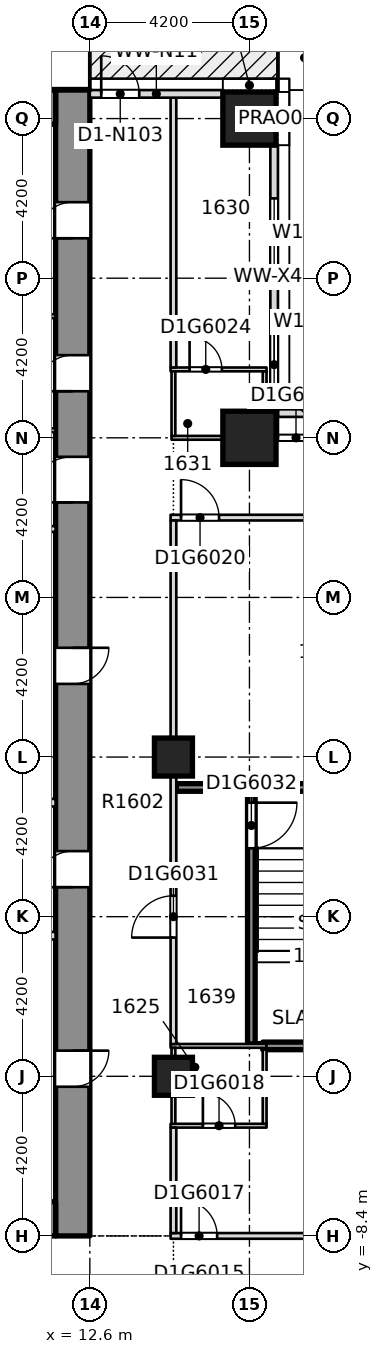
"""IFC4 building model, lengths in metres.
Left out: names, types, materials, properties, quantities, classifications, styles, units other than length and angle.
Written with IfcOpenShell. Run it as: python <this file> out.ifc"""

import sys

from ifc_helpers import new_model, si_unit, direction, frame, frame_2d, origin, origin_2d, place, context, subcontext, project, spatial, rectangle, extrude, element, fill, save


model = new_model("IFC4")
c1 = context("Model", 3, precision=1e-05, world=origin(), true_north=direction((0.0, 1.0)))
c2 = subcontext(c1, "Body", "Model", "MODEL_VIEW")
j1 = project(units=[si_unit("LENGTHUNIT", "METRE"), si_unit("PLANEANGLEUNIT", "RADIAN")], contexts=[c1])
p1 = place(None, origin())
s1 = spatial("IfcSite", under=j1, at=p1, CompositionType="ELEMENT")
p2 = place(p1, origin())
s2 = spatial("IfcBuilding", under=s1, at=p2, CompositionType="ELEMENT")
p3 = place(p2, frame((0.0, 0.0, 69.0)))
s3 = spatial("IfcBuildingStorey", under=s2, at=p3, CompositionType="ELEMENT", Elevation=69.0)
p4 = place(p3, frame((12.15, -8.4, -0.32), z_axis=(0.0, 0.0, 1.0), x_axis=(0.0, 1.0, 0.0)))
e1 = element("IfcWall", 1, at=p4, inside=s3, PredefinedType="SHEAR", context=c2, shape_type="SweptSolid", body=[
    extrude(rectangle(XDim=30.15, YDim=0.9, at=frame_2d((15.075, 0.0))), origin(), (0.0, 0.0, 1.0), 3.45),
])
p5 = place(p4, frame((3.925, 0.0, 0.32)))
e2 = element("IfcOpeningElement", 2, at=p5, cuts=e1, PredefinedType="OPENING", context=c2, shape_type="SweptSolid", body=[
    extrude(rectangle(XDim=0.95, YDim=2.1, at=frame_2d((0.475, 1.05))), frame((0.0, 0.46, 0.0), z_axis=(0.0, -1.0, 0.0), x_axis=(1.0, 0.0, 0.0)), (0.0, 0.0, 1.0), 0.92),
])
p6 = place(p4, frame((9.175, 0.0, 0.32)))
e3 = element("IfcOpeningElement", 3, at=p6, cuts=e1, PredefinedType="OPENING", context=c2, shape_type="SweptSolid", body=[
    extrude(rectangle(XDim=0.95, YDim=2.1, at=frame_2d((0.475, 1.05))), frame((0.0, 0.46, 0.0), z_axis=(0.0, -1.0, 0.0), x_axis=(1.0, 0.0, 0.0)), (0.0, 0.0, 1.0), 0.92),
])
p7 = place(p4, frame((14.525, 0.0, 0.32)))
e4 = element("IfcOpeningElement", 4, at=p7, cuts=e1, PredefinedType="OPENING", context=c2, shape_type="SweptSolid", body=[
    extrude(rectangle(XDim=0.95, YDim=2.1, at=frame_2d((0.475, 1.05))), frame((0.0, 0.46, 0.0), z_axis=(0.0, -1.0, 0.0), x_axis=(1.0, 0.0, 0.0)), (0.0, 0.0, 1.0), 0.92),
])
p8 = place(p4, frame((22.225, 0.0, 0.32)))
e5 = element("IfcOpeningElement", 5, at=p8, cuts=e1, PredefinedType="OPENING", context=c2, shape_type="SweptSolid", body=[
    extrude(rectangle(XDim=0.95, YDim=2.1, at=frame_2d((0.475, 1.05))), frame((0.0, 0.46, 0.0), z_axis=(0.0, -1.0, 0.0), x_axis=(1.0, 0.0, 0.0)), (0.0, 0.0, 1.0), 0.92),
])
p9 = place(p4, frame((26.25, 0.0, 0.32)))
e6 = element("IfcOpeningElement", 6, at=p9, cuts=e1, PredefinedType="OPENING", context=c2, shape_type="SweptSolid", body=[
    extrude(rectangle(XDim=0.95, YDim=2.1, at=frame_2d((0.475, 1.05))), frame((0.0, 0.46, 0.0), z_axis=(0.0, -1.0, 0.0), x_axis=(1.0, 0.0, 0.0)), (0.0, 0.0, 1.0), 0.92),
])
p10 = place(p4, frame((19.3, 0.0, 0.32)))
e7 = element("IfcOpeningElement", 7, at=p10, cuts=e1, PredefinedType="OPENING", context=c2, shape_type="SweptSolid", body=[
    extrude(rectangle(XDim=1.2, YDim=2.1, at=frame_2d((0.6, 1.05))), frame((0.0, 0.46, 0.0), z_axis=(0.0, -1.0, 0.0), x_axis=(1.0, 0.0, 0.0)), (0.0, 0.0, 1.0), 0.92),
])
p11 = place(p3, frame((-11.7, -7.95, -0.32), z_axis=(0.0, 0.0, 1.0), x_axis=(1.0, 0.0, 0.0)))
e8 = element("IfcWall", 8, at=p11, inside=s3, PredefinedType="SHEAR", context=c2, shape_type="SweptSolid", body=[
    extrude(rectangle(XDim=23.4, YDim=0.9, at=frame_2d((11.7, 0.0))), origin(), (0.0, 0.0, 1.0), 3.45),
])
p12 = place(p11, frame((6.95, 0.0, 0.32)))
e9 = element("IfcOpeningElement", 9, at=p12, cuts=e8, PredefinedType="OPENING", context=c2, shape_type="SweptSolid", body=[
    extrude(rectangle(XDim=1.8, YDim=2.1, at=frame_2d((0.9, 1.05))), frame((0.0, 0.46, 0.0), z_axis=(0.0, -1.0, 0.0), x_axis=(1.0, 0.0, 0.0)), (0.0, 0.0, 1.0), 0.92),
])
p13 = place(p11, frame((14.65, 0.0, 0.32)))
e10 = element("IfcOpeningElement", 10, at=p13, cuts=e8, PredefinedType="OPENING", context=c2, shape_type="SweptSolid", body=[
    extrude(rectangle(XDim=1.8, YDim=2.1, at=frame_2d((0.9, 1.05))), frame((0.0, 0.46, 0.0), z_axis=(0.0, -1.0, 0.0), x_axis=(1.0, 0.0, 0.0)), (0.0, 0.0, 1.0), 0.92),
])
p14 = place(p3, frame((-11.7, 21.3, -0.32), z_axis=(0.0, 0.0, 1.0), x_axis=(1.0, 0.0, 0.0)))
e11 = element("IfcWall", 11, at=p14, inside=s3, PredefinedType="SOLIDWALL", context=c2, shape_type="SweptSolid", body=[
    extrude(rectangle(XDim=23.4, YDim=0.9, at=frame_2d((11.7, 0.0))), origin(), (0.0, 0.0, 1.0), 3.45),
])
for number, where, z_axis, x_axis in (
    (12, (16.8, 12.6, -0.32), (0.0, 0.0, 1.0), (1.0, 0.0, 0.0)),
    (13, (16.8, 21.0, -0.32), (0.0, 0.0, 1.0), (1.0, 0.0, 0.0)),
):
    element("IfcColumn", number, at=place(p3, frame(where, z_axis=z_axis, x_axis=x_axis)), inside=s3, PredefinedType="COLUMN", context=c2, shape_type="SweptSolid", body=[
        extrude(rectangle(XDim=1.4, YDim=1.4, at=origin_2d()), origin(), (0.0, 0.0, 1.0), 3.45),
    ])
for number, where, z_axis, x_axis in (
    (14, (14.8, -4.2, -0.32), (0.0, 0.0, 1.0), (1.0, 0.0, 0.0)),
    (15, (14.8, 4.2, -0.32), (0.0, 0.0, 1.0), (1.0, 0.0, 0.0)),
):
    element("IfcColumn", number, at=place(p3, frame(where, z_axis=z_axis, x_axis=x_axis)), inside=s3, PredefinedType="COLUMN", context=c2, shape_type="SweptSolid", body=[
        extrude(rectangle(XDim=1.0, YDim=1.0, at=origin_2d()), origin(), (0.0, 0.0, 1.0), 3.45),
    ])
p15 = place(p3, frame((14.725, -8.4, 0.0), z_axis=(0.0, 0.0, 1.0), x_axis=(1.0, 0.0, 0.0)))
e16 = element("IfcWall", 16, at=p15, inside=s3, PredefinedType="PARTITIONING", context=c2, shape_type="SweptSolid", body=[
    extrude(rectangle(XDim=11.025, YDim=0.15, at=frame_2d((5.512, 0.0))), origin(), (0.0, 0.0, 1.0), 3.13),
])
p16 = place(p15, frame((0.275, 0.0, 0.0)))
e17 = element("IfcOpeningElement", 17, at=p16, cuts=e16, PredefinedType="OPENING", context=c2, shape_type="SweptSolid", body=[
    extrude(rectangle(XDim=0.95, YDim=2.1, at=frame_2d((0.475, 1.05))), frame((0.0, 0.085, 0.0), z_axis=(0.0, -1.0, 0.0), x_axis=(1.0, 0.0, 0.0)), (0.0, 0.0, 1.0), 0.17),
])
p17 = place(p3, frame((14.725, -5.5, 0.0), z_axis=(0.0, 0.0, 1.0), x_axis=(1.0, 0.0, 0.0)))
e18 = element("IfcWall", 18, at=p17, inside=s3, PredefinedType="PARTITIONING", context=c2, shape_type="SweptSolid", body=[
    extrude(rectangle(XDim=2.525, YDim=0.1, at=frame_2d((1.262, 0.0))), origin(), (0.0, 0.0, 1.0), 3.13),
])
p18 = place(p17, frame((0.85, 0.0, 0.0)))
e19 = element("IfcOpeningElement", 19, at=p18, cuts=e18, PredefinedType="OPENING", context=c2, shape_type="SweptSolid", body=[
    extrude(rectangle(XDim=0.85, YDim=2.1, at=frame_2d((0.425, 1.05))), frame((0.0, 0.06, 0.0), z_axis=(0.0, -1.0, 0.0), x_axis=(1.0, 0.0, 0.0)), (0.0, 0.0, 1.0), 0.12),
])
p19 = place(p3, frame((14.725, -3.4, 0.0), z_axis=(0.0, 0.0, 1.0), x_axis=(1.0, 0.0, 0.0)))
e20 = element("IfcWall", 20, at=p19, inside=s3, PredefinedType="PARTITIONING", context=c2, shape_type="SweptSolid", body=[
    extrude(rectangle(XDim=2.525, YDim=0.1, at=frame_2d((1.262, 0.0))), origin(), (0.0, 0.0, 1.0), 3.13),
])
p20 = place(p3, frame((17.15, -3.4, 0.0), z_axis=(0.0, 0.0, 1.0), x_axis=(1.0, 0.0, 0.0)))
e21 = element("IfcWall", 21, at=p20, inside=s3, PredefinedType="SOLIDWALL", context=c2, shape_type="SweptSolid", body=[
    extrude(rectangle(XDim=3.25, YDim=0.2, at=frame_2d((1.625, 0.0))), origin(), (0.0, 0.0, 1.0), 3.13),
])
p21 = place(p3, frame((14.875, 3.4, 0.0), z_axis=(0.0, 0.0, 1.0), x_axis=(1.0, 0.0, 0.0)))
e22 = element("IfcWall", 22, at=p21, inside=s3, PredefinedType="SOLIDWALL", context=c2, shape_type="SweptSolid", body=[
    extrude(rectangle(XDim=5.575, YDim=0.2, at=frame_2d((2.788, 0.0))), origin(), (0.0, 0.0, 1.0), 3.13),
])
p22 = place(p3, frame((14.725, 10.5, 0.0), z_axis=(0.0, 0.0, 1.0), x_axis=(1.0, 0.0, 0.0)))
e23 = element("IfcWall", 23, at=p22, inside=s3, PredefinedType="PARTITIONING", context=c2, shape_type="SweptSolid", body=[
    extrude(rectangle(XDim=11.025, YDim=0.15, at=frame_2d((5.512, 0.0))), origin(), (0.0, 0.0, 1.0), 3.13),
])
p23 = place(p22, frame((0.275, 0.0, 0.0)))
e24 = element("IfcOpeningElement", 24, at=p23, cuts=e23, PredefinedType="OPENING", context=c2, shape_type="SweptSolid", body=[
    extrude(rectangle(XDim=1.0, YDim=2.1, at=frame_2d((0.5, 1.05))), frame((0.0, 0.085, 0.0), z_axis=(0.0, -1.0, 0.0), x_axis=(1.0, 0.0, 0.0)), (0.0, 0.0, 1.0), 0.17),
])
p24 = place(p3, frame((14.75, 12.6, 0.0), z_axis=(0.0, 0.0, 1.0), x_axis=(1.0, 0.0, 0.0)))
e25 = element("IfcWall", 25, at=p24, inside=s3, PredefinedType="PARTITIONING", context=c2, shape_type="SweptSolid", body=[
    extrude(rectangle(XDim=2.5, YDim=0.1, at=frame_2d((1.25, 0.0))), origin(), (0.0, 0.0, 1.0), 3.13),
])
p25 = place(p3, frame((17.15, 12.6, 0.0), z_axis=(0.0, 0.0, 1.0), x_axis=(1.0, 0.0, 0.0)))
e26 = element("IfcWall", 26, at=p25, inside=s3, PredefinedType="PARTITIONING", context=c2, shape_type="SweptSolid", body=[
    extrude(rectangle(XDim=0.25, YDim=0.15, at=frame_2d((0.125, 0.0))), origin(), (0.0, 0.0, 1.0), 3.13),
])
p26 = place(p3, frame((14.725, 14.4, 0.0), z_axis=(0.0, 0.0, 1.0), x_axis=(1.0, 0.0, 0.0)))
e27 = element("IfcWall", 27, at=p26, inside=s3, PredefinedType="PARTITIONING", context=c2, shape_type="SweptSolid", body=[
    extrude(rectangle(XDim=2.525, YDim=0.1, at=frame_2d((1.262, 0.0))), origin(), (0.0, 0.0, 1.0), 3.13),
])
p27 = place(p26, frame((0.5, 0.0, 0.0)))
e28 = element("IfcOpeningElement", 28, at=p27, cuts=e27, PredefinedType="OPENING", context=c2, shape_type="SweptSolid", body=[
    extrude(rectangle(XDim=0.85, YDim=2.1, at=frame_2d((0.425, 1.05))), frame((0.0, 0.06, 0.0), z_axis=(0.0, -1.0, 0.0), x_axis=(1.0, 0.0, 0.0)), (0.0, 0.0, 1.0), 0.12),
])
p28 = place(p3, frame((14.8, -8.325, 0.0), z_axis=(0.0, 0.0, 1.0), x_axis=(0.0, 1.0, 0.0)))
e29 = element("IfcWall", 29, at=p28, inside=s3, PredefinedType="PARTITIONING", context=c2, shape_type="SweptSolid", body=[
    extrude(rectangle(XDim=2.775, YDim=0.15, at=frame_2d((1.387, 0.0))), origin(), (0.0, 0.0, 1.0), 3.13),
])
p29 = place(p3, frame((14.8, -5.45, 0.0), z_axis=(0.0, 0.0, 1.0), x_axis=(0.0, 1.0, 0.0)))
e30 = element("IfcWall", 30, at=p29, inside=s3, PredefinedType="PARTITIONING", context=c2, shape_type="SweptSolid", body=[
    extrude(rectangle(XDim=2.0, YDim=0.1, at=frame_2d((1.0, 0.0))), origin(), (0.0, 0.0, 1.0), 3.13),
])
p30 = place(p3, frame((14.8, -3.35, 0.0), z_axis=(0.0, 0.0, 1.0), x_axis=(0.0, 1.0, 0.0)))
e31 = element("IfcWall", 31, at=p30, inside=s3, PredefinedType="PARTITIONING", context=c2, shape_type="SweptSolid", body=[
    extrude(rectangle(XDim=13.775, YDim=0.15, at=frame_2d((6.888, 0.0))), origin(), (0.0, 0.0, 1.0), 3.13),
])
p31 = place(p30, frame((2.8, 0.0, 0.0)))
e32 = element("IfcOpeningElement", 32, at=p31, cuts=e31, PredefinedType="OPENING", context=c2, shape_type="SweptSolid", body=[
    extrude(rectangle(XDim=1.1, YDim=2.1, at=frame_2d((0.55, 1.05))), frame((0.0, 0.085, 0.0), z_axis=(0.0, -1.0, 0.0), x_axis=(1.0, 0.0, 0.0)), (0.0, 0.0, 1.0), 0.17),
])
p32 = place(p3, frame((14.8, 12.65, 0.0), z_axis=(0.0, 0.0, 1.0), x_axis=(0.0, 1.0, 0.0)))
e33 = element("IfcWall", 33, at=p32, inside=s3, PredefinedType="PARTITIONING", context=c2, shape_type="SweptSolid", body=[
    extrude(rectangle(XDim=1.7, YDim=0.1, at=frame_2d((0.85, 0.0))), origin(), (0.0, 0.0, 1.0), 3.13),
])
p33 = place(p3, frame((14.8, 14.45, 0.0), z_axis=(0.0, 0.0, 1.0), x_axis=(0.0, 1.0, 0.0)))
e34 = element("IfcWall", 34, at=p33, inside=s3, PredefinedType="PARTITIONING", context=c2, shape_type="SweptSolid", body=[
    extrude(rectangle(XDim=7.1, YDim=0.15, at=frame_2d((3.55, 0.0))), origin(), (0.0, 0.0, 1.0), 3.13),
])
p34 = place(p3, frame((16.85, -3.35, 0.0), z_axis=(0.0, 0.0, 1.0), x_axis=(0.0, 1.0, 0.0)))
e35 = element("IfcWall", 35, at=p34, inside=s3, PredefinedType="SOLIDWALL", context=c2, shape_type="SweptSolid", body=[
    extrude(rectangle(XDim=6.65, YDim=0.2, at=frame_2d((3.325, 0.0))), origin(), (0.0, 0.0, 1.0), 3.13),
])
p35 = place(p34, frame((5.15, 0.0, 0.0)))
e36 = element("IfcOpeningElement", 36, at=p35, cuts=e35, PredefinedType="OPENING", context=c2, shape_type="SweptSolid", body=[
    extrude(rectangle(XDim=1.2, YDim=2.1, at=frame_2d((0.6, 1.05))), frame((0.0, 0.11, 0.0), z_axis=(0.0, -1.0, 0.0), x_axis=(1.0, 0.0, 0.0)), (0.0, 0.0, 1.0), 0.22),
])
p36 = place(p3, frame((17.2, -5.45, 0.0), z_axis=(0.0, 0.0, 1.0), x_axis=(0.0, 1.0, 0.0)))
e37 = element("IfcWall", 37, at=p36, inside=s3, PredefinedType="PARTITIONING", context=c2, shape_type="SweptSolid", body=[
    extrude(rectangle(XDim=1.95, YDim=0.1, at=frame_2d((0.975, 0.0))), origin(), (0.0, 0.0, 1.0), 3.13),
])
p37 = place(p3, frame((17.2, 12.675, 0.0), z_axis=(0.0, 0.0, 1.0), x_axis=(0.0, 1.0, 0.0)))
e38 = element("IfcWall", 38, at=p37, inside=s3, PredefinedType="PARTITIONING", context=c2, shape_type="SweptSolid", body=[
    extrude(rectangle(XDim=1.675, YDim=0.1, at=frame_2d((0.837, 0.0))), origin(), (0.0, 0.0, 1.0), 3.13),
])
p38 = place(p3, frame((24.5, 13.25, 0.0), z_axis=(0.0, 0.0, 1.0), x_axis=(-1.0, 0.0, 0.0)))
e39 = element("IfcWall", 39, at=p38, inside=s3, PredefinedType="STANDARD", context=c2, shape_type="SweptSolid", body=[
    extrude(rectangle(XDim=6.95, YDim=0.2, at=frame_2d((3.475, 0.0))), origin(), (0.0, 0.0, 1.0), 3.13),
])
p39 = place(p3, frame((17.45, 13.35, 0.0), z_axis=(0.0, 0.0, 1.0), x_axis=(0.0, 1.0, 0.0)))
e40 = element("IfcWall", 40, at=p39, inside=s3, PredefinedType="STANDARD", context=c2, shape_type="SweptSolid", body=[
    extrude(rectangle(XDim=6.95, YDim=0.2, at=frame_2d((3.475, 0.0))), origin(), (0.0, 0.0, 1.0), 3.13),
])
p40 = place(p39, frame((0.275, 0.0, 0.2)))
e41 = element("IfcOpeningElement", 41, at=p40, cuts=e40, PredefinedType="OPENING", context=c2, shape_type="SweptSolid", body=[
    extrude(rectangle(XDim=1.8, YDim=2.65, at=frame_2d((0.9, 1.325))), frame((0.0, 0.11, 0.0), z_axis=(0.0, -1.0, 0.0), x_axis=(1.0, 0.0, 0.0)), (0.0, 0.0, 1.0), 0.22),
])
p41 = place(p39, frame((3.75, 0.0, 0.2)))
e42 = element("IfcOpeningElement", 42, at=p41, cuts=e40, PredefinedType="OPENING", context=c2, shape_type="SweptSolid", body=[
    extrude(rectangle(XDim=1.8, YDim=2.65, at=frame_2d((0.9, 1.325))), frame((0.0, 0.11, 0.0), z_axis=(0.0, -1.0, 0.0), x_axis=(1.0, 0.0, 0.0)), (0.0, 0.0, 1.0), 0.22),
])
p42 = place(p3, frame((16.1, 21.65, 0.0), z_axis=(0.0, 0.0, 1.0), x_axis=(-1.0, 0.0, 0.0)))
e43 = element("IfcWall", 43, at=p42, inside=s3, PredefinedType="STANDARD", context=c2, shape_type="SweptSolid", body=[
    extrude(rectangle(XDim=3.5, YDim=0.2, at=frame_2d((1.75, 0.0))), origin(), (0.0, 0.0, 1.0), 3.13),
])
p43 = place(p42, frame((2.2, 0.0, 0.0)))
e44 = element("IfcOpeningElement", 44, at=p43, cuts=e43, PredefinedType="OPENING", context=c2, shape_type="SweptSolid", body=[
    extrude(rectangle(XDim=1.0, YDim=2.4, at=frame_2d((0.5, 1.2))), frame((0.0, 0.11, 0.0), z_axis=(0.0, -1.0, 0.0), x_axis=(1.0, 0.0, 0.0)), (0.0, 0.0, 1.0), 0.22),
])
for number, where, z_axis, x_axis in (
    (45, (8.851, -0.5, 0.0), (0.0, 0.0, 1.0), (1.0, 0.0, 0.0)),
    (46, (8.851, 3.0, 0.0), (0.0, 0.0, 1.0), (1.0, 0.0, 0.0)),
):
    element("IfcWall", number, at=place(p3, frame(where, z_axis=z_axis, x_axis=x_axis)), inside=s3, PredefinedType="PARTITIONING", context=c2, shape_type="SweptSolid", body=[
        extrude(rectangle(XDim=2.848, YDim=0.2, at=frame_2d((1.424, 0.0))), origin(), (0.0, 0.0, 1.0), 3.13),
    ])
p44 = place(p3, frame((8.851, 10.2, 0.0), z_axis=(0.0, 0.0, 1.0), x_axis=(1.0, 0.0, 0.0)))
e47 = element("IfcWall", 47, at=p44, inside=s3, PredefinedType="PARTITIONING", context=c2, shape_type="SweptSolid", body=[
    extrude(rectangle(XDim=2.848, YDim=0.15, at=frame_2d((1.424, 0.0))), origin(), (0.0, 0.0, 1.0), 3.13),
])
for number, where, z_axis, x_axis in (
    (48, (8.851, 12.8, 0.0), (0.0, 0.0, 1.0), (1.0, 0.0, 0.0)),
    (49, (8.851, 15.8, 0.0), (0.0, 0.0, 1.0), (1.0, 0.0, 0.0)),
):
    element("IfcWall", number, at=place(p3, frame(where, z_axis=z_axis, x_axis=x_axis)), inside=s3, PredefinedType="PARTITIONING", context=c2, shape_type="SweptSolid", body=[
        extrude(rectangle(XDim=2.848, YDim=0.1, at=frame_2d((1.424, 0.0))), origin(), (0.0, 0.0, 1.0), 3.13),
    ])
p45 = place(p3, frame((17.4, 12.6, 0.0), z_axis=(0.0, 0.0, 1.0), x_axis=(1.0, 0.0, 0.0)))
e50 = element("IfcWall", 50, at=p45, inside=s3, PredefinedType="PARTITIONING", context=c2, shape_type="SweptSolid", body=[
    extrude(rectangle(XDim=7.1, YDim=0.15, at=frame_2d((3.55, 0.0))), origin(), (0.0, 0.0, 1.0), 2.58),
])
p46 = place(p45, frame((0.15, 0.0, 0.0)))
e51 = element("IfcOpeningElement", 51, at=p46, cuts=e50, PredefinedType="OPENING", context=c2, shape_type="SweptSolid", body=[
    extrude(rectangle(XDim=0.95, YDim=2.1, at=frame_2d((0.475, 1.05))), frame((0.0, 0.085, 0.0), z_axis=(0.0, -1.0, 0.0), x_axis=(1.0, 0.0, 0.0)), (0.0, 0.0, 1.0), 0.17),
])
p47 = place(p16, origin())
e52 = element("IfcDoor", 52, at=p47, inside=s3, OperationType="SINGLE_SWING_LEFT", PredefinedType="DOOR", context=c2, shape_type="SweptSolid", body=[
    extrude(rectangle(XDim=0.95, YDim=2.1, at=frame_2d((0.475, 1.05))), frame((0.0, 0.025, 0.0), z_axis=(0.0, -1.0, 0.0), x_axis=(1.0, 0.0, 0.0)), (0.0, 0.0, 1.0), 0.05),
])
fill(e17, e52)
p48 = place(p18, origin())
e53 = element("IfcDoor", 53, at=p48, inside=s3, OperationType="SINGLE_SWING_LEFT", PredefinedType="DOOR", context=c2, shape_type="SweptSolid", body=[
    extrude(rectangle(XDim=0.85, YDim=2.1, at=frame_2d((0.425, 1.05))), frame((0.0, 0.025, 0.0), z_axis=(0.0, -1.0, 0.0), x_axis=(1.0, 0.0, 0.0)), (0.0, 0.0, 1.0), 0.05),
])
fill(e19, e53)
p49 = place(p23, origin())
e54 = element("IfcDoor", 54, at=p49, inside=s3, OperationType="SINGLE_SWING_RIGHT", PredefinedType="DOOR", context=c2, shape_type="SweptSolid", body=[
    extrude(rectangle(XDim=1.0, YDim=2.1, at=frame_2d((0.5, 1.05))), frame((0.0, 0.025, 0.0), z_axis=(0.0, -1.0, 0.0), x_axis=(1.0, 0.0, 0.0)), (0.0, 0.0, 1.0), 0.05),
])
fill(e24, e54)
p50 = place(p46, origin())
e55 = element("IfcDoor", 55, at=p50, inside=s3, OperationType="SINGLE_SWING_LEFT", PredefinedType="DOOR", context=c2, shape_type="SweptSolid", body=[
    extrude(rectangle(XDim=0.95, YDim=2.1, at=frame_2d((0.475, 1.05))), frame((0.0, 0.025, 0.0), z_axis=(0.0, -1.0, 0.0), x_axis=(1.0, 0.0, 0.0)), (0.0, 0.0, 1.0), 0.05),
])
fill(e51, e55)
p51 = place(p27, origin())
e56 = element("IfcDoor", 56, at=p51, inside=s3, OperationType="SINGLE_SWING_RIGHT", PredefinedType="DOOR", context=c2, shape_type="SweptSolid", body=[
    extrude(rectangle(XDim=0.85, YDim=2.1, at=frame_2d((0.425, 1.05))), frame((0.0, 0.025, 0.0), z_axis=(0.0, -1.0, 0.0), x_axis=(1.0, 0.0, 0.0)), (0.0, 0.0, 1.0), 0.05),
])
fill(e28, e56)
p52 = place(p31, origin())
e57 = element("IfcDoor", 57, at=p52, inside=s3, OperationType="SINGLE_SWING_LEFT", PredefinedType="DOOR", context=c2, shape_type="SweptSolid", body=[
    extrude(rectangle(XDim=1.1, YDim=2.1, at=frame_2d((0.55, 1.05))), frame((0.0, 0.025, 0.0), z_axis=(0.0, -1.0, 0.0), x_axis=(1.0, 0.0, 0.0)), (0.0, 0.0, 1.0), 0.05),
])
fill(e32, e57)
p53 = place(p35, origin())
e58 = element("IfcDoor", 58, at=p53, inside=s3, OperationType="SINGLE_SWING_LEFT", PredefinedType="DOOR", context=c2, shape_type="SweptSolid", body=[
    extrude(rectangle(XDim=1.2, YDim=2.1, at=frame_2d((0.6, 1.05))), frame((0.0, 0.025, 0.0), z_axis=(0.0, -1.0, 0.0), x_axis=(1.0, 0.0, 0.0)), (0.0, 0.0, 1.0), 0.05),
])
fill(e36, e58)
p54 = place(p40, origin())
e59 = element("IfcWindow", 59, at=p54, inside=s3, PartitioningType="SINGLE_PANEL", PredefinedType="WINDOW", context=c2, shape_type="SweptSolid", body=[
    extrude(rectangle(XDim=1.8, YDim=2.65, at=frame_2d((0.9, 1.325))), frame((0.0, 0.03, 0.0), z_axis=(0.0, -1.0, 0.0), x_axis=(1.0, 0.0, 0.0)), (0.0, 0.0, 1.0), 0.06),
])
fill(e41, e59)
p55 = place(p41, origin())
e60 = element("IfcWindow", 60, at=p55, inside=s3, PartitioningType="SINGLE_PANEL", PredefinedType="WINDOW", context=c2, shape_type="SweptSolid", body=[
    extrude(rectangle(XDim=1.8, YDim=2.65, at=frame_2d((0.9, 1.325))), frame((0.0, 0.03, 0.0), z_axis=(0.0, -1.0, 0.0), x_axis=(1.0, 0.0, 0.0)), (0.0, 0.0, 1.0), 0.06),
])
fill(e42, e60)
p56 = place(p43, origin())
e61 = element("IfcDoor", 61, at=p56, inside=s3, OperationType="SINGLE_SWING_LEFT", PredefinedType="DOOR", context=c2, shape_type="SweptSolid", body=[
    extrude(rectangle(XDim=1.0, YDim=2.4, at=frame_2d((0.5, 1.2))), frame((0.0, 0.025, 0.0), z_axis=(0.0, -1.0, 0.0), x_axis=(1.0, 0.0, 0.0)), (0.0, 0.0, 1.0), 0.05),
])
fill(e44, e61)
p57 = place(p5, origin())
e62 = element("IfcDoor", 62, at=p57, inside=s3, OperationType="SINGLE_SWING_LEFT", PredefinedType="DOOR", context=c2, shape_type="SweptSolid", body=[
    extrude(rectangle(XDim=0.95, YDim=2.1, at=frame_2d((0.475, 1.05))), frame((0.0, 0.025, 0.0), z_axis=(0.0, -1.0, 0.0), x_axis=(1.0, 0.0, 0.0)), (0.0, 0.0, 1.0), 0.05),
])
fill(e2, e62)
p58 = place(p6, origin())
e63 = element("IfcDoor", 63, at=p58, inside=s3, OperationType="SINGLE_SWING_LEFT", PredefinedType="DOOR", context=c2, shape_type="SweptSolid", body=[
    extrude(rectangle(XDim=0.95, YDim=2.1, at=frame_2d((0.475, 1.05))), frame((0.0, 0.025, 0.0), z_axis=(0.0, -1.0, 0.0), x_axis=(1.0, 0.0, 0.0)), (0.0, 0.0, 1.0), 0.05),
])
fill(e3, e63)
p59 = place(p7, origin())
e64 = element("IfcDoor", 64, at=p59, inside=s3, OperationType="SINGLE_SWING_LEFT", PredefinedType="DOOR", context=c2, shape_type="SweptSolid", body=[
    extrude(rectangle(XDim=0.95, YDim=2.1, at=frame_2d((0.475, 1.05))), frame((0.0, 0.025, 0.0), z_axis=(0.0, -1.0, 0.0), x_axis=(1.0, 0.0, 0.0)), (0.0, 0.0, 1.0), 0.05),
])
fill(e4, e64)
p60 = place(p8, origin())
e65 = element("IfcDoor", 65, at=p60, inside=s3, OperationType="SINGLE_SWING_LEFT", PredefinedType="DOOR", context=c2, shape_type="SweptSolid", body=[
    extrude(rectangle(XDim=0.95, YDim=2.1, at=frame_2d((0.475, 1.05))), frame((0.0, 0.025, 0.0), z_axis=(0.0, -1.0, 0.0), x_axis=(1.0, 0.0, 0.0)), (0.0, 0.0, 1.0), 0.05),
])
fill(e5, e65)
p61 = place(p9, origin())
e66 = element("IfcDoor", 66, at=p61, inside=s3, OperationType="SINGLE_SWING_LEFT", PredefinedType="DOOR", context=c2, shape_type="SweptSolid", body=[
    extrude(rectangle(XDim=0.95, YDim=2.1, at=frame_2d((0.475, 1.05))), frame((0.0, 0.025, 0.0), z_axis=(0.0, -1.0, 0.0), x_axis=(1.0, 0.0, 0.0)), (0.0, 0.0, 1.0), 0.05),
])
fill(e6, e66)
p62 = place(p10, origin())
e67 = element("IfcDoor", 67, at=p62, inside=s3, OperationType="SINGLE_SWING_LEFT", PredefinedType="DOOR", context=c2, shape_type="SweptSolid", body=[
    extrude(rectangle(XDim=1.2, YDim=2.1, at=frame_2d((0.6, 1.05))), frame((0.0, 0.025, 0.0), z_axis=(0.0, -1.0, 0.0), x_axis=(1.0, 0.0, 0.0)), (0.0, 0.0, 1.0), 0.05),
])
fill(e7, e67)
save(model, sys.argv[1])
